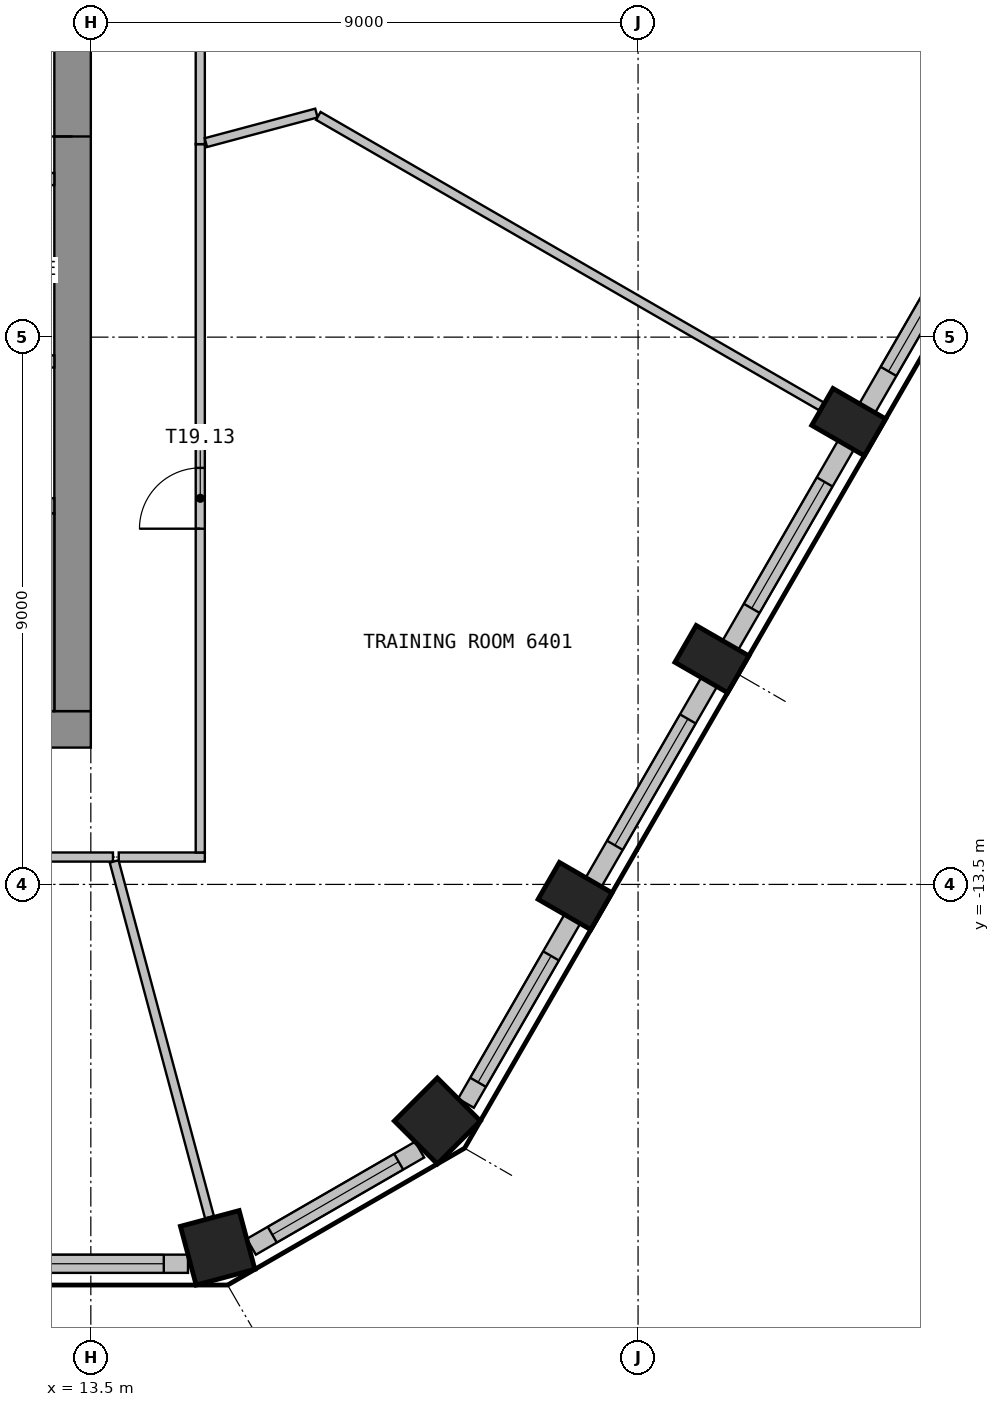
"""IFC4 building model, lengths in metres.
Left out: names, types, materials, properties, quantities, classifications, styles, units other than length and angle.
Written with IfcOpenShell. Run it as: python <this file> out.ifc"""

import sys

from ifc_helpers import new_model, si_unit, direction, frame, frame_2d, origin, origin_2d, place, context, subcontext, project, spatial, rectangle, extrude, element, fill, save


model = new_model("IFC4")
c1 = context("Model", 3, precision=1e-05, world=origin(), true_north=direction((0.0, 1.0)))
c2 = subcontext(c1, "Body", "Model", "MODEL_VIEW")
j1 = project(units=[si_unit("LENGTHUNIT", "METRE"), si_unit("PLANEANGLEUNIT", "RADIAN")], contexts=[c1])
p1 = place(None, origin())
s1 = spatial("IfcSite", under=j1, at=p1, CompositionType="ELEMENT")
p2 = place(p1, origin())
s2 = spatial("IfcBuilding", under=s1, at=p2, CompositionType="ELEMENT")
p3 = place(p2, frame((0.0, 0.0, 258.6)))
s3 = spatial("IfcBuildingStorey", under=s2, at=p3, CompositionType="ELEMENT", Elevation=258.6)
for number, where, z_axis, x_axis in (
    (1, (15.586, -19.476, 0.0), (0.0, 0.0, 1.0), (0.966, 0.259, 0.0)),
    (2, (19.199, -17.39, 0.0), (0.0, 0.0, 1.0), (0.707, 0.707, 0.0)),
):
    element("IfcColumn", number, at=place(p3, frame(where, z_axis=z_axis, x_axis=x_axis)), inside=s3, PredefinedType="COLUMN", context=c2, shape_type="SweptSolid", body=[
        extrude(rectangle(XDim=1.0, YDim=1.0, at=origin_2d()), origin(), (0.0, 0.0, 1.0), 3.575),
    ])
for number, where, z_axis, x_axis in (
    (3, (21.464, -13.691, 0.0), (0.0, 0.0, 1.0), (0.5, 0.866, 0.0)),
    (4, (23.714, -9.794, 0.0), (0.0, 0.0, 1.0), (0.5, 0.866, 0.0)),
    (5, (25.964, -5.897, 0.0), (0.0, 0.0, 1.0), (0.5, 0.866, 0.0)),
):
    element("IfcColumn", number, at=place(p3, frame(where, z_axis=z_axis, x_axis=x_axis)), inside=s3, PredefinedType="COLUMN", context=c2, shape_type="SweptSolid", body=[
        extrude(rectangle(XDim=0.7, YDim=1.0, at=origin_2d()), origin(), (0.0, 0.0, 1.0), 3.575),
    ])
p4 = place(p3, frame((11.601, -19.739, 0.0), z_axis=(0.0, 0.0, 1.0), x_axis=(1.0, 0.0, 0.0)))
e6 = element("IfcWall", 6, at=p4, inside=s3, PredefinedType="SOLIDWALL", context=c2, shape_type="SweptSolid", body=[
    extrude(rectangle(XDim=3.498, YDim=0.3, at=frame_2d((1.749, 0.0))), origin(), (0.0, 0.0, 1.0), 3.575),
])
p5 = place(p4, frame((0.699, 0.0, 0.9)))
e7 = element("IfcOpeningElement", 7, at=p5, cuts=e6, PredefinedType="OPENING", context=c2, shape_type="SweptSolid", body=[
    extrude(rectangle(XDim=2.4, YDim=2.1, at=frame_2d((1.2, 1.05))), frame((0.0, 0.16, 0.0), z_axis=(0.0, -1.0, 0.0), x_axis=(1.0, 0.0, 0.0)), (0.0, 0.0, 1.0), 0.32),
])
p6 = place(p3, frame((16.14, -19.459, 0.0), z_axis=(0.0, 0.0, 1.0), x_axis=(0.866025316205, 0.500000151692, 0.0)))
e8 = element("IfcWall", 8, at=p6, inside=s3, PredefinedType="SOLIDWALL", context=c2, shape_type="SweptSolid", body=[
    extrude(rectangle(XDim=3.196, YDim=0.3, at=frame_2d((1.598, 0.0))), origin(), (0.0, 0.0, 1.0), 3.575),
])
p7 = place(p6, frame((0.398, 0.0, 0.9)))
e9 = element("IfcOpeningElement", 9, at=p7, cuts=e8, PredefinedType="OPENING", context=c2, shape_type="SweptSolid", body=[
    extrude(rectangle(XDim=2.4, YDim=2.1, at=frame_2d((1.2, 1.05))), frame((0.0, 0.16, 0.0), z_axis=(0.0, -1.0, 0.0), x_axis=(1.0, 0.0, 0.0)), (0.0, 0.0, 1.0), 0.32),
])
p8 = place(p3, frame((19.67, -17.099, 0.0), z_axis=(0.0, 0.0, 1.0), x_axis=(0.499960102815, 0.866048437209, 0.0)))
e10 = element("IfcWall", 10, at=p8, inside=s3, PredefinedType="SOLIDWALL", context=c2, shape_type="SweptSolid", body=[
    extrude(rectangle(XDim=3.498, YDim=0.3, at=frame_2d((1.749, 0.0))), origin(), (0.0, 0.0, 1.0), 3.575),
])
p9 = place(p8, frame((0.398, 0.0, 0.9)))
e11 = element("IfcOpeningElement", 11, at=p9, cuts=e10, PredefinedType="OPENING", context=c2, shape_type="SweptSolid", body=[
    extrude(rectangle(XDim=2.4, YDim=2.1, at=frame_2d((1.2, 1.05))), frame((0.0, 0.16, 0.0), z_axis=(0.0, -1.0, 0.0), x_axis=(1.0, 0.0, 0.0)), (0.0, 0.0, 1.0), 0.32),
])
p10 = place(p3, frame((21.769, -13.463, 0.0), z_axis=(0.0, 0.0, 1.0), x_axis=(0.499982058975, 0.866035761792, 0.0)))
e12 = element("IfcWall", 12, at=p10, inside=s3, PredefinedType="SOLIDWALL", context=c2, shape_type="SweptSolid", body=[
    extrude(rectangle(XDim=3.799, YDim=0.3, at=frame_2d((1.899, 0.0))), origin(), (0.0, 0.0, 1.0), 3.575),
])
p11 = place(p10, frame((0.699, 0.0, 0.9)))
e13 = element("IfcOpeningElement", 13, at=p11, cuts=e12, PredefinedType="OPENING", context=c2, shape_type="SweptSolid", body=[
    extrude(rectangle(XDim=2.4, YDim=2.1, at=frame_2d((1.2, 1.05))), frame((0.0, 0.16, 0.0), z_axis=(0.0, -1.0, 0.0), x_axis=(1.0, 0.0, 0.0)), (0.0, 0.0, 1.0), 0.32),
])
p12 = place(p3, frame((24.019, -9.566, 0.0), z_axis=(0.0, 0.0, 1.0), x_axis=(0.499982058975, 0.866035761792, 0.0)))
e14 = element("IfcWall", 14, at=p12, inside=s3, PredefinedType="SOLIDWALL", context=c2, shape_type="SweptSolid", body=[
    extrude(rectangle(XDim=3.799, YDim=0.3, at=frame_2d((1.899, 0.0))), origin(), (0.0, 0.0, 1.0), 3.575),
])
p13 = place(p12, frame((0.699, 0.0, 0.9)))
e15 = element("IfcOpeningElement", 15, at=p13, cuts=e14, PredefinedType="OPENING", context=c2, shape_type="SweptSolid", body=[
    extrude(rectangle(XDim=2.4, YDim=2.1, at=frame_2d((1.2, 1.05))), frame((0.0, 0.16, 0.0), z_axis=(0.0, -1.0, 0.0), x_axis=(1.0, 0.0, 0.0)), (0.0, 0.0, 1.0), 0.32),
])
p14 = place(p3, frame((26.269, -5.669, 0.0), z_axis=(0.0, 0.0, 1.0), x_axis=(0.499990325971, 0.866030989016, 0.0)))
e16 = element("IfcWall", 16, at=p14, inside=s3, PredefinedType="SOLIDWALL", context=c2, shape_type="SweptSolid", body=[
    extrude(rectangle(XDim=3.498, YDim=0.3, at=frame_2d((1.749, 0.0))), origin(), (0.0, 0.0, 1.0), 3.575),
])
p15 = place(p14, frame((0.699, 0.0, 0.9)))
e17 = element("IfcOpeningElement", 17, at=p15, cuts=e16, PredefinedType="OPENING", context=c2, shape_type="SweptSolid", body=[
    extrude(rectangle(XDim=2.4, YDim=2.1, at=frame_2d((1.2, 1.05))), frame((0.0, 0.16, 0.0), z_axis=(0.0, -1.0, 0.0), x_axis=(1.0, 0.0, 0.0)), (0.0, 0.0, 1.0), 0.32),
])
p16 = place(p3, frame((-13.5, -10.95, 0.0), z_axis=(0.0, 0.0, 1.0), x_axis=(1.0, 0.0, 0.0)))
e18 = element("IfcWall", 18, at=p16, inside=s3, PredefinedType="SHEAR", context=c2, shape_type="SweptSolid", body=[
    extrude(rectangle(XDim=27.0, YDim=0.6, at=frame_2d((13.5, 0.0))), origin(), (0.0, 0.0, 1.0), 3.575),
])
p17 = place(p16, frame((12.3, 0.0, 0.0)))
e19 = element("IfcOpeningElement", 19, at=p17, cuts=e18, PredefinedType="OPENING", context=c2, shape_type="SweptSolid", body=[
    extrude(rectangle(XDim=2.4, YDim=2.1, at=frame_2d((1.2, 1.05))), frame((0.0, 0.31, 0.0), z_axis=(0.0, -1.0, 0.0), x_axis=(1.0, 0.0, 0.0)), (0.0, 0.0, 1.0), 0.62),
])
p18 = place(p16, frame((1.05, 0.0, 0.0)))
e20 = element("IfcOpeningElement", 20, at=p18, cuts=e18, PredefinedType="OPENING", context=c2, shape_type="SweptSolid", body=[
    extrude(rectangle(XDim=1.2, YDim=2.1, at=frame_2d((0.6, 1.05))), frame((0.0, 0.31, 0.0), z_axis=(0.0, -1.0, 0.0), x_axis=(1.0, 0.0, 0.0)), (0.0, 0.0, 1.0), 0.62),
])
p19 = place(p16, frame((24.75, 0.0, 0.0)))
e21 = element("IfcOpeningElement", 21, at=p19, cuts=e18, PredefinedType="OPENING", context=c2, shape_type="SweptSolid", body=[
    extrude(rectangle(XDim=1.2, YDim=2.1, at=frame_2d((0.6, 1.05))), frame((0.0, 0.31, 0.0), z_axis=(0.0, -1.0, 0.0), x_axis=(1.0, 0.0, 0.0)), (0.0, 0.0, 1.0), 0.62),
])
p20 = place(p3, frame((13.2, -10.65, 0.0), z_axis=(0.0, 0.0, 1.0), x_axis=(0.0, 1.0, 0.0)))
e22 = element("IfcWall", 22, at=p20, inside=s3, PredefinedType="SHEAR", context=c2, shape_type="SweptSolid", body=[
    extrude(rectangle(XDim=21.3, YDim=0.6, at=frame_2d((10.65, 0.0))), origin(), (0.0, 0.0, 1.0), 3.575),
])
p21 = place(p20, frame((9.45, 0.0, 0.0)))
e23 = element("IfcOpeningElement", 23, at=p21, cuts=e22, PredefinedType="OPENING", context=c2, shape_type="SweptSolid", body=[
    extrude(rectangle(XDim=2.4, YDim=2.1, at=frame_2d((1.2, 1.05))), frame((0.0, 0.31, 0.0), z_axis=(0.0, -1.0, 0.0), x_axis=(1.0, 0.0, 0.0)), (0.0, 0.0, 1.0), 0.62),
])
p22 = place(p3, frame((2.8, -7.275, 0.0), z_axis=(0.0, 0.0, 1.0), x_axis=(1.0, 0.0, 0.0)))
e24 = element("IfcWall", 24, at=p22, inside=s3, PredefinedType="SHEAR", context=c2, shape_type="SweptSolid", body=[
    extrude(rectangle(XDim=10.1, YDim=0.25, at=frame_2d((5.05, 0.0))), origin(), (0.0, 0.0, 1.0), 3.575),
])
p23 = place(p22, frame((8.45, 0.0, 0.0)))
e25 = element("IfcOpeningElement", 25, at=p23, cuts=e24, PredefinedType="OPENING", context=c2, shape_type="SweptSolid", body=[
    extrude(rectangle(XDim=1.2, YDim=2.1, at=frame_2d((0.6, 1.05))), frame((0.0, 0.135, 0.0), z_axis=(0.0, -1.0, 0.0), x_axis=(1.0, 0.0, 0.0)), (0.0, 0.0, 1.0), 0.27),
])
p24 = place(p3, frame((12.775, -10.65, 0.0), z_axis=(0.0, 0.0, 1.0), x_axis=(0.0, 1.0, 0.0)))
e26 = element("IfcWall", 26, at=p24, inside=s3, PredefinedType="SHEAR", context=c2, shape_type="SweptSolid", body=[
    extrude(rectangle(XDim=3.25, YDim=0.25, at=frame_2d((1.625, 0.0))), origin(), (0.0, 0.0, 1.0), 3.575),
])
p25 = place(p3, frame((4.325, -1.9, 0.0), z_axis=(0.0, 0.0, 1.0), x_axis=(1.0, 0.0, 0.0)))
e27 = element("IfcWall", 27, at=p25, inside=s3, PredefinedType="PARTITIONING", context=c2, shape_type="SweptSolid", body=[
    extrude(rectangle(XDim=8.575, YDim=0.2, at=frame_2d((4.288, 0.0))), origin(), (0.0, 0.0, 1.0), 3.575),
])
p26 = place(p25, frame((1.008, 0.0, 0.0)))
e28 = element("IfcOpeningElement", 28, at=p26, cuts=e27, PredefinedType="OPENING", context=c2, shape_type="SweptSolid", body=[
    extrude(rectangle(XDim=0.9, YDim=2.1, at=frame_2d((0.45, 1.05))), frame((0.0, 0.11, 0.0), z_axis=(0.0, -1.0, 0.0), x_axis=(1.0, 0.0, 0.0)), (0.0, 0.0, 1.0), 0.22),
])
p27 = place(p25, frame((3.88, 0.0, 0.0)))
e29 = element("IfcOpeningElement", 29, at=p27, cuts=e27, PredefinedType="OPENING", context=c2, shape_type="SweptSolid", body=[
    extrude(rectangle(XDim=0.9, YDim=2.1, at=frame_2d((0.45, 1.05))), frame((0.0, 0.11, 0.0), z_axis=(0.0, -1.0, 0.0), x_axis=(1.0, 0.0, 0.0)), (0.0, 0.0, 1.0), 0.22),
])
p28 = place(p25, frame((6.71, 0.0, 0.0)))
e30 = element("IfcOpeningElement", 30, at=p28, cuts=e27, PredefinedType="OPENING", context=c2, shape_type="SweptSolid", body=[
    extrude(rectangle(XDim=0.9, YDim=2.1, at=frame_2d((0.45, 1.05))), frame((0.0, 0.11, 0.0), z_axis=(0.0, -1.0, 0.0), x_axis=(1.0, 0.0, 0.0)), (0.0, 0.0, 1.0), 0.22),
])
p29 = place(p3, frame((4.325, -4.9, 0.0), z_axis=(0.0, 0.0, 1.0), x_axis=(1.0, 0.0, 0.0)))
e31 = element("IfcWall", 31, at=p29, inside=s3, PredefinedType="PARTITIONING", context=c2, shape_type="SweptSolid", body=[
    extrude(rectangle(XDim=8.575, YDim=0.2, at=frame_2d((4.288, 0.0))), origin(), (0.0, 0.0, 1.0), 3.575),
])
p30 = place(p3, frame((2.25, -13.05, 0.0), z_axis=(0.0, 0.0, 1.0), x_axis=(1.0, 0.0, 0.0)))
e32 = element("IfcWall", 32, at=p30, inside=s3, PredefinedType="PARTITIONING", context=c2, shape_type="SweptSolid", body=[
    extrude(rectangle(XDim=11.614, YDim=0.15, at=frame_2d((5.807, 0.0))), origin(), (0.0, 0.0, 1.0), 3.575),
])
p31 = place(p30, frame((5.307, 0.0, 0.0)))
e33 = element("IfcOpeningElement", 33, at=p31, cuts=e32, PredefinedType="OPENING", context=c2, shape_type="SweptSolid", body=[
    extrude(rectangle(XDim=1.0, YDim=2.1, at=frame_2d((0.5, 1.05))), frame((0.0, 0.085, 0.0), z_axis=(0.0, -1.0, 0.0), x_axis=(1.0, 0.0, 0.0)), (0.0, 0.0, 1.0), 0.17),
])
p32 = place(p3, frame((13.959, -13.05, 0.0), z_axis=(0.0, 0.0, 1.0), x_axis=(1.0, 0.0, 0.0)))
e34 = element("IfcWall", 34, at=p32, inside=s3, PredefinedType="PARTITIONING", context=c2, shape_type="SweptSolid", body=[
    extrude(rectangle(XDim=1.416, YDim=0.15, at=frame_2d((0.708, 0.0))), origin(), (0.0, 0.0, 1.0), 3.575),
])
p33 = place(p3, frame((13.883, -13.122, 0.0), z_axis=(0.0, 0.0, 1.0), x_axis=(0.258896568031, -0.965905050749, 0.0)))
e35 = element("IfcWall", 35, at=p33, inside=s3, PredefinedType="PARTITIONING", context=c2, shape_type="SweptSolid", body=[
    extrude(rectangle(XDim=6.058, YDim=0.15, at=frame_2d((3.029, 0.0))), origin(), (0.0, 0.0, 1.0), 3.575),
])
p34 = place(p3, frame((15.3, -12.975, 0.0), z_axis=(0.0, 0.0, 1.0), x_axis=(0.0, 1.0, 0.0)))
e36 = element("IfcWall", 36, at=p34, inside=s3, PredefinedType="PARTITIONING", context=c2, shape_type="SweptSolid", body=[
    extrude(rectangle(XDim=11.649, YDim=0.15, at=frame_2d((5.825, 0.0))), origin(), (0.0, 0.0, 1.0), 3.575),
])
p35 = place(p34, frame((5.324, 0.0, 0.0)))
e37 = element("IfcOpeningElement", 37, at=p35, cuts=e36, PredefinedType="OPENING", context=c2, shape_type="SweptSolid", body=[
    extrude(rectangle(XDim=1.0, YDim=2.1, at=frame_2d((0.5, 1.05))), frame((0.0, 0.085, 0.0), z_axis=(0.0, -1.0, 0.0), x_axis=(1.0, 0.0, 0.0)), (0.0, 0.0, 1.0), 0.17),
])
p36 = place(p3, frame((15.3, -1.326, 0.0), z_axis=(0.0, 0.0, 1.0), x_axis=(0.0, 1.0, 0.0)))
e38 = element("IfcWall", 38, at=p36, inside=s3, PredefinedType="PARTITIONING", context=c2, shape_type="SweptSolid", body=[
    extrude(rectangle(XDim=6.262, YDim=0.15, at=frame_2d((3.131, 0.0))), origin(), (0.0, 0.0, 1.0), 3.575),
])
p37 = place(p36, frame((2.631, 0.0, 0.0)))
e39 = element("IfcOpeningElement", 39, at=p37, cuts=e38, PredefinedType="OPENING", context=c2, shape_type="SweptSolid", body=[
    extrude(rectangle(XDim=1.0, YDim=2.1, at=frame_2d((0.5, 1.05))), frame((0.0, 0.085, 0.0), z_axis=(0.0, -1.0, 0.0), x_axis=(1.0, 0.0, 0.0)), (0.0, 0.0, 1.0), 0.17),
])
p38 = place(p3, frame((15.392, -1.302, 0.0), z_axis=(0.0, 0.0, 1.0), x_axis=(0.966004184231, 0.258526432009, 0.0)))
e40 = element("IfcWall", 40, at=p38, inside=s3, PredefinedType="PARTITIONING", context=c2, shape_type="SweptSolid", body=[
    extrude(rectangle(XDim=1.882, YDim=0.15, at=frame_2d((0.941, 0.0))), origin(), (0.0, 0.0, 1.0), 3.575),
])
p39 = place(p3, frame((17.241, -0.862, 0.0), z_axis=(0.0, 0.0, 1.0), x_axis=(0.86605322396, -0.499951810946, 0.0)))
e41 = element("IfcWall", 41, at=p39, inside=s3, PredefinedType="PARTITIONING", context=c2, shape_type="SweptSolid", body=[
    extrude(rectangle(XDim=9.552, YDim=0.15, at=frame_2d((4.776, 0.0))), origin(), (0.0, 0.0, 1.0), 3.575),
])
p40 = place(p5, origin())
e42 = element("IfcWindow", 42, at=p40, inside=s3, PartitioningType="SINGLE_PANEL", PredefinedType="WINDOW", context=c2, shape_type="SweptSolid", body=[
    extrude(rectangle(XDim=2.4, YDim=2.1, at=frame_2d((1.2, 1.05))), frame((0.0, 0.03, 0.0), z_axis=(0.0, -1.0, 0.0), x_axis=(1.0, 0.0, 0.0)), (0.0, 0.0, 1.0), 0.06),
])
fill(e7, e42)
p41 = place(p7, origin())
e43 = element("IfcWindow", 43, at=p41, inside=s3, PartitioningType="SINGLE_PANEL", PredefinedType="WINDOW", context=c2, shape_type="SweptSolid", body=[
    extrude(rectangle(XDim=2.4, YDim=2.1, at=frame_2d((1.2, 1.05))), frame((0.0, 0.03, 0.0), z_axis=(0.0, -1.0, 0.0), x_axis=(1.0, 0.0, 0.0)), (0.0, 0.0, 1.0), 0.06),
])
fill(e9, e43)
p42 = place(p9, origin())
e44 = element("IfcWindow", 44, at=p42, inside=s3, PartitioningType="SINGLE_PANEL", PredefinedType="WINDOW", context=c2, shape_type="SweptSolid", body=[
    extrude(rectangle(XDim=2.4, YDim=2.1, at=frame_2d((1.2, 1.05))), frame((0.0, 0.03, 0.0), z_axis=(0.0, -1.0, 0.0), x_axis=(1.0, 0.0, 0.0)), (0.0, 0.0, 1.0), 0.06),
])
fill(e11, e44)
p43 = place(p11, origin())
e45 = element("IfcWindow", 45, at=p43, inside=s3, PartitioningType="SINGLE_PANEL", PredefinedType="WINDOW", context=c2, shape_type="SweptSolid", body=[
    extrude(rectangle(XDim=2.4, YDim=2.1, at=frame_2d((1.2, 1.05))), frame((0.0, 0.03, 0.0), z_axis=(0.0, -1.0, 0.0), x_axis=(1.0, 0.0, 0.0)), (0.0, 0.0, 1.0), 0.06),
])
fill(e13, e45)
p44 = place(p13, origin())
e46 = element("IfcWindow", 46, at=p44, inside=s3, PartitioningType="SINGLE_PANEL", PredefinedType="WINDOW", context=c2, shape_type="SweptSolid", body=[
    extrude(rectangle(XDim=2.4, YDim=2.1, at=frame_2d((1.2, 1.05))), frame((0.0, 0.03, 0.0), z_axis=(0.0, -1.0, 0.0), x_axis=(1.0, 0.0, 0.0)), (0.0, 0.0, 1.0), 0.06),
])
fill(e15, e46)
p45 = place(p15, origin())
e47 = element("IfcWindow", 47, at=p45, inside=s3, PartitioningType="SINGLE_PANEL", PredefinedType="WINDOW", context=c2, shape_type="SweptSolid", body=[
    extrude(rectangle(XDim=2.4, YDim=2.1, at=frame_2d((1.2, 1.05))), frame((0.0, 0.03, 0.0), z_axis=(0.0, -1.0, 0.0), x_axis=(1.0, 0.0, 0.0)), (0.0, 0.0, 1.0), 0.06),
])
fill(e17, e47)
p46 = place(p21, origin())
e48 = element("IfcDoor", 48, at=p46, inside=s3, OperationType="DOUBLE_DOOR_DOUBLE_SWING", PredefinedType="DOOR", context=c2, shape_type="SweptSolid", body=[
    extrude(rectangle(XDim=2.4, YDim=2.1, at=frame_2d((1.2, 1.05))), frame((0.0, 0.025, 0.0), z_axis=(0.0, -1.0, 0.0), x_axis=(1.0, 0.0, 0.0)), (0.0, 0.0, 1.0), 0.05),
])
fill(e23, e48)
p47 = place(p35, origin())
e49 = element("IfcDoor", 49, at=p47, inside=s3, OperationType="SINGLE_SWING_LEFT", PredefinedType="DOOR", context=c2, shape_type="SweptSolid", body=[
    extrude(rectangle(XDim=1.0, YDim=2.1, at=frame_2d((0.5, 1.05))), frame((0.0, 0.025, 0.0), z_axis=(0.0, -1.0, 0.0), x_axis=(1.0, 0.0, 0.0)), (0.0, 0.0, 1.0), 0.05),
])
fill(e37, e49)
save(model, sys.argv[1])
